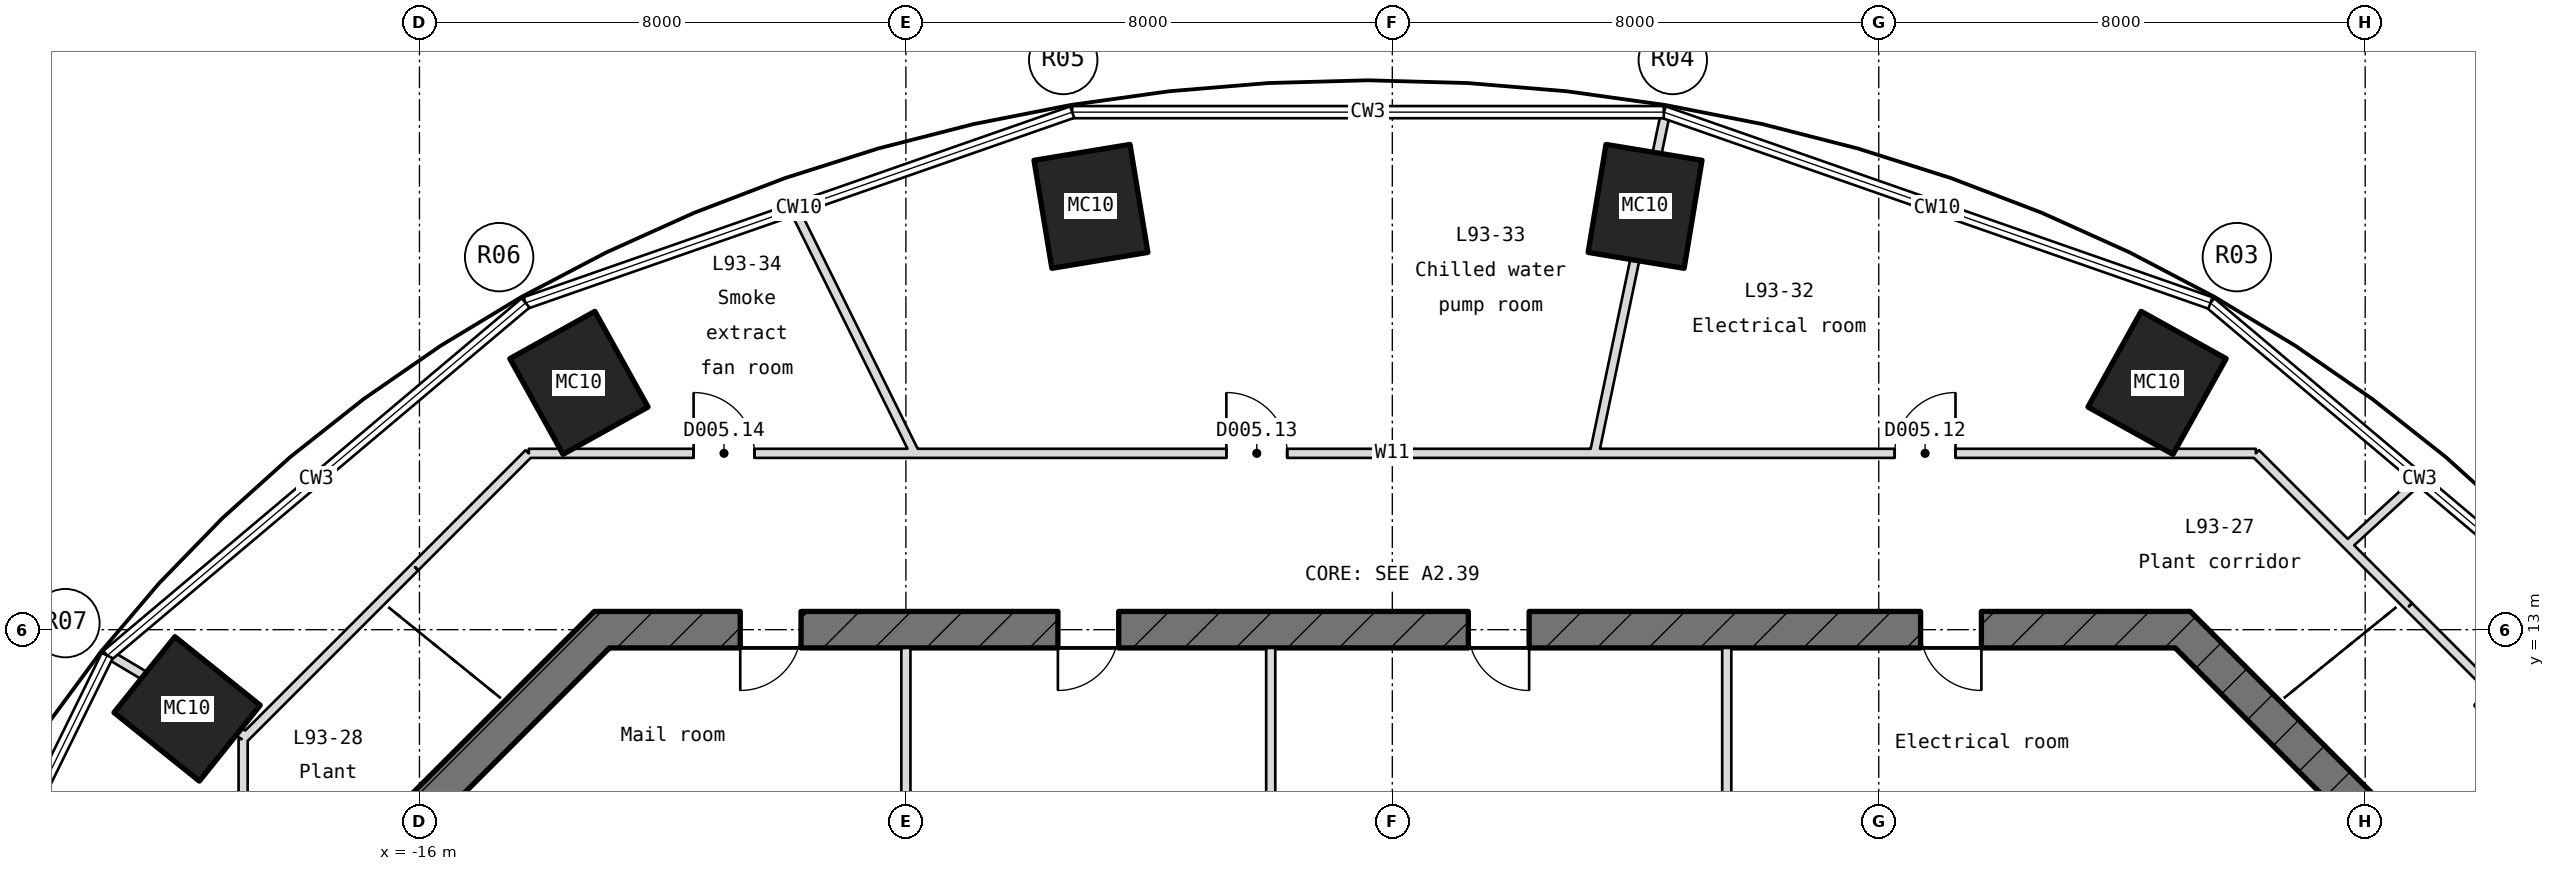
"""IFC4 building model, lengths in metres.
Left out: names, types, materials, properties, quantities, classifications, styles, units other than length and angle.
Written with IfcOpenShell. Run it as: python <this file> out.ifc"""

import sys

from ifc_helpers import new_model, si_unit, direction, frame, frame_2d, origin, origin_2d, place, context, subcontext, project, spatial, rectangle, hollow_rectangle, extrude, element, fill, save


model = new_model("IFC4")
c1 = context("Model", 3, precision=1e-05, world=origin(), true_north=direction((0.0, 1.0)))
c2 = subcontext(c1, "Body", "Model", "MODEL_VIEW")
j1 = project(units=[si_unit("LENGTHUNIT", "METRE"), si_unit("PLANEANGLEUNIT", "RADIAN")], contexts=[c1])
p1 = place(None, origin())
s1 = spatial("IfcSite", under=j1, at=p1, CompositionType="ELEMENT")
p2 = place(p1, origin())
s2 = spatial("IfcBuilding", under=s1, at=p2, CompositionType="ELEMENT")
p3 = place(p2, frame((0.0, 0.0, 413.55)))
s3 = spatial("IfcBuildingStorey", under=s2, at=p3, CompositionType="ELEMENT", Elevation=413.55)
for number, where, z_axis, x_axis in (
    (1, (19.021, 11.698, -0.2), (0.0, 0.0, 1.0), (0.626, -0.78, 0.0)),
    (2, (12.577, 17.06, -0.2), (0.0, 0.0, 1.0), (0.874, -0.486, 0.0)),
    (3, (4.157, 19.962, -0.2), (0.0, 0.0, 1.0), (0.987, -0.163, 0.0)),
    (4, (-4.957, 19.962, -0.2), (0.0, 0.0, 1.0), (0.987, 0.163, 0.0)),
    (5, (-13.377, 17.06, -0.2), (0.0, 0.0, 1.0), (0.874, 0.486, 0.0)),
    (6, (-19.822, 11.698, -0.2), (0.0, 0.0, 1.0), (0.626, 0.78, 0.0)),
):
    element("IfcColumn", number, at=place(p3, frame(where, z_axis=z_axis, x_axis=x_axis)), inside=s3, PredefinedType="COLUMN", context=c2, shape_type="SweptSolid", body=[
        extrude(hollow_rectangle(XDim=1.6, YDim=1.8, WallThickness=0.045, at=origin_2d()), origin(), (0.0, 0.0, 1.0), 5.0),
    ])
p4 = place(p3, frame((16.088, 9.912, -0.2), z_axis=(0.0, 0.0, 1.0), x_axis=(-0.707106781187, 0.707106781187, 0.0)))
e7 = element("IfcWall", 7, at=p4, inside=s3, PredefinedType="SHEAR", context=c2, shape_type="SweptSolid", body=[
    extrude(rectangle(XDim=4.491, YDim=0.6, at=frame_2d((2.246, 0.0))), origin(), (0.0, 0.0, 1.0), 5.0),
])
p5 = place(p3, frame((13.124, 13.0, -0.2), z_axis=(0.0, 0.0, 1.0), x_axis=(-1.0, 0.0, 0.0)))
e8 = element("IfcWall", 8, at=p5, inside=s3, PredefinedType="SHEAR", context=c2, shape_type="SweptSolid", body=[
    extrude(rectangle(XDim=26.249, YDim=0.6, at=frame_2d((13.124, 0.0))), origin(), (0.0, 0.0, 1.0), 5.0),
])
p6 = place(p5, frame((22.849, 0.0, 0.2)))
e9 = element("IfcOpeningElement", 9, at=p6, cuts=e8, PredefinedType="OPENING", context=c2, shape_type="SweptSolid", body=[
    extrude(rectangle(XDim=1.0, YDim=2.1, at=frame_2d((0.5, 1.05))), frame((0.0, 0.31, 0.0), z_axis=(0.0, -1.0, 0.0), x_axis=(1.0, 0.0, 0.0)), (0.0, 0.0, 1.0), 0.62),
])
p7 = place(p5, frame((17.624, 0.0, 0.2)))
e10 = element("IfcOpeningElement", 10, at=p7, cuts=e8, PredefinedType="OPENING", context=c2, shape_type="SweptSolid", body=[
    extrude(rectangle(XDim=1.0, YDim=2.1, at=frame_2d((0.5, 1.05))), frame((0.0, 0.31, 0.0), z_axis=(0.0, -1.0, 0.0), x_axis=(1.0, 0.0, 0.0)), (0.0, 0.0, 1.0), 0.62),
])
p8 = place(p5, frame((10.874, 0.0, 0.2)))
e11 = element("IfcOpeningElement", 11, at=p8, cuts=e8, PredefinedType="OPENING", context=c2, shape_type="SweptSolid", body=[
    extrude(rectangle(XDim=1.0, YDim=2.1, at=frame_2d((0.5, 1.05))), frame((0.0, 0.31, 0.0), z_axis=(0.0, -1.0, 0.0), x_axis=(1.0, 0.0, 0.0)), (0.0, 0.0, 1.0), 0.62),
])
p9 = place(p5, frame((3.436, 0.0, 0.2)))
e12 = element("IfcOpeningElement", 12, at=p9, cuts=e8, PredefinedType="OPENING", context=c2, shape_type="SweptSolid", body=[
    extrude(rectangle(XDim=1.0, YDim=2.1, at=frame_2d((0.5, 1.05))), frame((0.0, 0.31, 0.0), z_axis=(0.0, -1.0, 0.0), x_axis=(1.0, 0.0, 0.0)), (0.0, 0.0, 1.0), 0.62),
])
p10 = place(p3, frame((-12.912, 13.088, -0.2), z_axis=(0.0, 0.0, 1.0), x_axis=(-0.707106781187, -0.707106781187, 0.0)))
e13 = element("IfcWall", 13, at=p10, inside=s3, PredefinedType="SHEAR", context=c2, shape_type="SweptSolid", body=[
    extrude(rectangle(XDim=4.491, YDim=0.6, at=frame_2d((2.246, 0.0))), origin(), (0.0, 0.0, 1.0), 5.0),
])
for number, where, z_axis, x_axis in (
    (14, (-8.0, 5.425, 0.0), (0.0, 0.0, 1.0), (0.0, 1.0, 0.0)),
    (15, (-2.0, 5.425, 0.0), (0.0, 0.0, 1.0), (0.0, 1.0, 0.0)),
    (16, (5.5, 5.425, 0.0), (0.0, 0.0, 1.0), (0.0, 1.0, 0.0)),
):
    element("IfcWall", number, at=place(p3, frame(where, z_axis=z_axis, x_axis=x_axis)), inside=s3, PredefinedType="PARTITIONING", context=c2, shape_type="SweptSolid", body=[
        extrude(rectangle(XDim=7.275, YDim=0.15, at=frame_2d((3.637, 0.0))), origin(), (0.0, 0.0, 1.0), 4.8),
    ])
p11 = place(p3, frame((-14.201, 15.9, 0.0), z_axis=(0.0, 0.0, 1.0), x_axis=(1.0, 0.0, 0.0)))
e17 = element("IfcWall", 17, at=p11, inside=s3, PredefinedType="PARTITIONING", context=c2, shape_type="SweptSolid", body=[
    extrude(rectangle(XDim=28.403, YDim=0.15, at=frame_2d((14.201, 0.0))), origin(), (0.0, 0.0, 1.0), 4.8),
])
p12 = place(p11, frame((22.463, 0.0, 0.0)))
e18 = element("IfcOpeningElement", 18, at=p12, cuts=e17, PredefinedType="OPENING", context=c2, shape_type="SweptSolid", body=[
    extrude(rectangle(XDim=1.0, YDim=2.1, at=frame_2d((0.5, 1.05))), frame((0.0, 0.085, 0.0), z_axis=(0.0, -1.0, 0.0), x_axis=(1.0, 0.0, 0.0)), (0.0, 0.0, 1.0), 0.17),
])
p13 = place(p11, frame((11.472, 0.0, 0.0)))
e19 = element("IfcOpeningElement", 19, at=p13, cuts=e17, PredefinedType="OPENING", context=c2, shape_type="SweptSolid", body=[
    extrude(rectangle(XDim=1.0, YDim=2.1, at=frame_2d((0.5, 1.05))), frame((0.0, 0.085, 0.0), z_axis=(0.0, -1.0, 0.0), x_axis=(1.0, 0.0, 0.0)), (0.0, 0.0, 1.0), 0.17),
])
p14 = place(p11, frame((2.71, 0.0, 0.0)))
e20 = element("IfcOpeningElement", 20, at=p14, cuts=e17, PredefinedType="OPENING", context=c2, shape_type="SweptSolid", body=[
    extrude(rectangle(XDim=1.0, YDim=2.1, at=frame_2d((0.5, 1.05))), frame((0.0, 0.085, 0.0), z_axis=(0.0, -1.0, 0.0), x_axis=(1.0, 0.0, 0.0)), (0.0, 0.0, 1.0), 0.17),
])
p15 = place(p3, frame((15.711, 14.39, 0.0), z_axis=(0.0, 0.0, 1.0), x_axis=(0.737460947252, 0.675389777298, 0.0)))
e21 = element("IfcWall", 21, at=p15, inside=s3, PredefinedType="PARTITIONING", context=c2, shape_type="SweptSolid", body=[
    extrude(rectangle(XDim=1.585, YDim=0.15, at=frame_2d((0.792, 0.0))), origin(), (0.0, 0.0, 1.0), 4.8),
])
p16 = place(p3, frame((-18.9, 11.201, 0.0), z_axis=(0.0, 0.0, 1.0), x_axis=(0.707106781187, 0.707106781187, 0.0)))
e22 = element("IfcWall", 22, at=p16, inside=s3, PredefinedType="PARTITIONING", context=c2, shape_type="SweptSolid", body=[
    extrude(rectangle(XDim=3.999, YDim=0.15, at=frame_2d((2.0, 0.0))), origin(), (0.0, 0.0, 1.0), 4.8),
])
p17 = place(p3, frame((-16.072, 14.029, 0.0), z_axis=(0.0, 0.0, 1.0), x_axis=(0.707060644966, 0.707152914397, 0.0)))
e23 = element("IfcWall", 23, at=p17, inside=s3, PredefinedType="PARTITIONING", context=c2, shape_type="SweptSolid", body=[
    extrude(rectangle(XDim=2.646, YDim=0.15, at=frame_2d((1.323, 0.0))), origin(), (0.0, 0.0, 1.0), 4.338),
])
p18 = place(p3, frame((3.323, 15.9, 0.0), z_axis=(0.0, 0.0, 1.0), x_axis=(0.204534536933, 0.978859348018, 0.0)))
e24 = element("IfcWall", 24, at=p18, inside=s3, PredefinedType="PARTITIONING", context=c2, shape_type="SweptSolid", body=[
    extrude(rectangle(XDim=3.377, YDim=0.15, at=frame_2d((1.688, 0.0))), origin(), (0.0, 0.0, 1.0), 4.383),
])
p19 = place(p3, frame((4.014, 19.205, 0.0), z_axis=(0.0, 0.0, 1.0), x_axis=(0.204608200798, 0.978843952919, 0.0)))
e25 = element("IfcWall", 25, at=p19, inside=s3, PredefinedType="PARTITIONING", context=c2, shape_type="SweptSolid", body=[
    extrude(rectangle(XDim=2.326, YDim=0.15, at=frame_2d((1.163, 0.0))), origin(), (0.0, 0.0, 1.0), 4.8),
])
p20 = place(p3, frame((-18.9, -9.448, 0.0), z_axis=(0.0, 0.0, 1.0), x_axis=(0.0, 1.0, 0.0)))
e26 = element("IfcWall", 26, at=p20, inside=s3, PredefinedType="PARTITIONING", context=c2, shape_type="SweptSolid", body=[
    extrude(rectangle(XDim=20.649, YDim=0.15, at=frame_2d((10.325, 0.0))), origin(), (0.0, 0.0, 1.0), 4.8),
])
p21 = place(p20, frame((16.46, 0.0, 0.0)))
e27 = element("IfcOpeningElement", 27, at=p21, cuts=e26, PredefinedType="OPENING", context=c2, shape_type="SweptSolid", body=[
    extrude(rectangle(XDim=1.0, YDim=2.1, at=frame_2d((0.5, 1.05))), frame((0.0, 0.085, 0.0), z_axis=(0.0, -1.0, 0.0), x_axis=(1.0, 0.0, 0.0)), (0.0, 0.0, 1.0), 0.17),
])
p22 = place(p20, frame((7.988, 0.0, 0.0)))
e28 = element("IfcOpeningElement", 28, at=p22, cuts=e26, PredefinedType="OPENING", context=c2, shape_type="SweptSolid", body=[
    extrude(rectangle(XDim=1.0, YDim=2.1, at=frame_2d((0.5, 1.05))), frame((0.0, 0.085, 0.0), z_axis=(0.0, -1.0, 0.0), x_axis=(1.0, 0.0, 0.0)), (0.0, 0.0, 1.0), 0.17),
])
p23 = place(p3, frame((-7.839, 15.872, 0.0), z_axis=(0.0, 0.0, 1.0), x_axis=(-0.442805191424, 0.896617846381, 0.0)))
e29 = element("IfcWall", 29, at=p23, inside=s3, PredefinedType="PARTITIONING", context=c2, shape_type="SweptSolid", body=[
    extrude(rectangle(XDim=4.48, YDim=0.15, at=frame_2d((2.24, 0.0))), origin(), (0.0, 0.0, 1.0), 4.8),
])
p24 = place(p3, frame((18.412, 11.689, 0.0), z_axis=(0.0, 0.0, 1.0), x_axis=(-0.707055831388, 0.707157727314, 0.0)))
e30 = element("IfcWall", 30, at=p24, inside=s3, PredefinedType="PARTITIONING", context=c2, shape_type="SweptSolid", body=[
    extrude(rectangle(XDim=2.396, YDim=0.15, at=frame_2d((1.198, 0.0))), origin(), (0.0, 0.0, 1.0), 4.338),
])
p25 = place(p3, frame((16.718, 13.383, 0.0), z_axis=(0.0, 0.0, 1.0), x_axis=(-0.70703818665, 0.707175369069, 0.0)))
e31 = element("IfcWall", 31, at=p25, inside=s3, PredefinedType="PARTITIONING", context=c2, shape_type="SweptSolid", body=[
    extrude(rectangle(XDim=3.559, YDim=0.15, at=frame_2d((1.78, 0.0))), origin(), (0.0, 0.0, 1.0), 4.8),
])
p26 = place(p3, frame((-18.854, 11.247, 0.0), z_axis=(0.0, 0.0, 1.0), x_axis=(-0.858770374849, 0.51236065743, 0.0)))
e32 = element("IfcWall", 32, at=p26, inside=s3, PredefinedType="PARTITIONING", context=c2, shape_type="SweptSolid", body=[
    extrude(rectangle(XDim=2.608, YDim=0.15, at=frame_2d((1.304, 0.0))), origin(), (0.0, 0.0, 1.0), 4.8),
])
p27 = place(p6, origin())
e33 = element("IfcDoor", 33, at=p27, inside=s3, OperationType="SINGLE_SWING_RIGHT", PredefinedType="DOOR", context=c2, shape_type="SweptSolid", body=[
    extrude(rectangle(XDim=1.0, YDim=2.1, at=frame_2d((0.5, 1.05))), frame((0.0, 0.025, 0.0), z_axis=(0.0, -1.0, 0.0), x_axis=(1.0, 0.0, 0.0)), (0.0, 0.0, 1.0), 0.05),
])
fill(e9, e33)
p28 = place(p7, origin())
e34 = element("IfcDoor", 34, at=p28, inside=s3, OperationType="SINGLE_SWING_RIGHT", PredefinedType="DOOR", context=c2, shape_type="SweptSolid", body=[
    extrude(rectangle(XDim=1.0, YDim=2.1, at=frame_2d((0.5, 1.05))), frame((0.0, 0.025, 0.0), z_axis=(0.0, -1.0, 0.0), x_axis=(1.0, 0.0, 0.0)), (0.0, 0.0, 1.0), 0.05),
])
fill(e10, e34)
p29 = place(p8, origin())
e35 = element("IfcDoor", 35, at=p29, inside=s3, OperationType="SINGLE_SWING_RIGHT", PredefinedType="DOOR", context=c2, shape_type="SweptSolid", body=[
    extrude(rectangle(XDim=1.0, YDim=2.1, at=frame_2d((0.5, 1.05))), frame((0.0, 0.025, 0.0), z_axis=(0.0, -1.0, 0.0), x_axis=(1.0, 0.0, 0.0)), (0.0, 0.0, 1.0), 0.05),
])
fill(e11, e35)
p30 = place(p9, origin())
e36 = element("IfcDoor", 36, at=p30, inside=s3, OperationType="SINGLE_SWING_RIGHT", PredefinedType="DOOR", context=c2, shape_type="SweptSolid", body=[
    extrude(rectangle(XDim=1.0, YDim=2.1, at=frame_2d((0.5, 1.05))), frame((0.0, 0.025, 0.0), z_axis=(0.0, -1.0, 0.0), x_axis=(1.0, 0.0, 0.0)), (0.0, 0.0, 1.0), 0.05),
])
fill(e12, e36)
p31 = place(p12, origin())
e37 = element("IfcDoor", 37, at=p31, inside=s3, OperationType="SINGLE_SWING_RIGHT", PredefinedType="DOOR", context=c2, shape_type="SweptSolid", body=[
    extrude(rectangle(XDim=1.0, YDim=2.1, at=frame_2d((0.5, 1.05))), frame((0.0, 0.025, 0.0), z_axis=(0.0, -1.0, 0.0), x_axis=(1.0, 0.0, 0.0)), (0.0, 0.0, 1.0), 0.05),
])
fill(e18, e37)
p32 = place(p13, origin())
e38 = element("IfcDoor", 38, at=p32, inside=s3, OperationType="SINGLE_SWING_RIGHT", PredefinedType="DOOR", context=c2, shape_type="SweptSolid", body=[
    extrude(rectangle(XDim=1.0, YDim=2.1, at=frame_2d((0.5, 1.05))), frame((0.0, 0.025, 0.0), z_axis=(0.0, -1.0, 0.0), x_axis=(1.0, 0.0, 0.0)), (0.0, 0.0, 1.0), 0.05),
])
fill(e19, e38)
p33 = place(p14, origin())
e39 = element("IfcDoor", 39, at=p33, inside=s3, OperationType="SINGLE_SWING_RIGHT", PredefinedType="DOOR", context=c2, shape_type="SweptSolid", body=[
    extrude(rectangle(XDim=1.0, YDim=2.1, at=frame_2d((0.5, 1.05))), frame((0.0, 0.025, 0.0), z_axis=(0.0, -1.0, 0.0), x_axis=(1.0, 0.0, 0.0)), (0.0, 0.0, 1.0), 0.05),
])
fill(e20, e39)
save(model, sys.argv[1])
